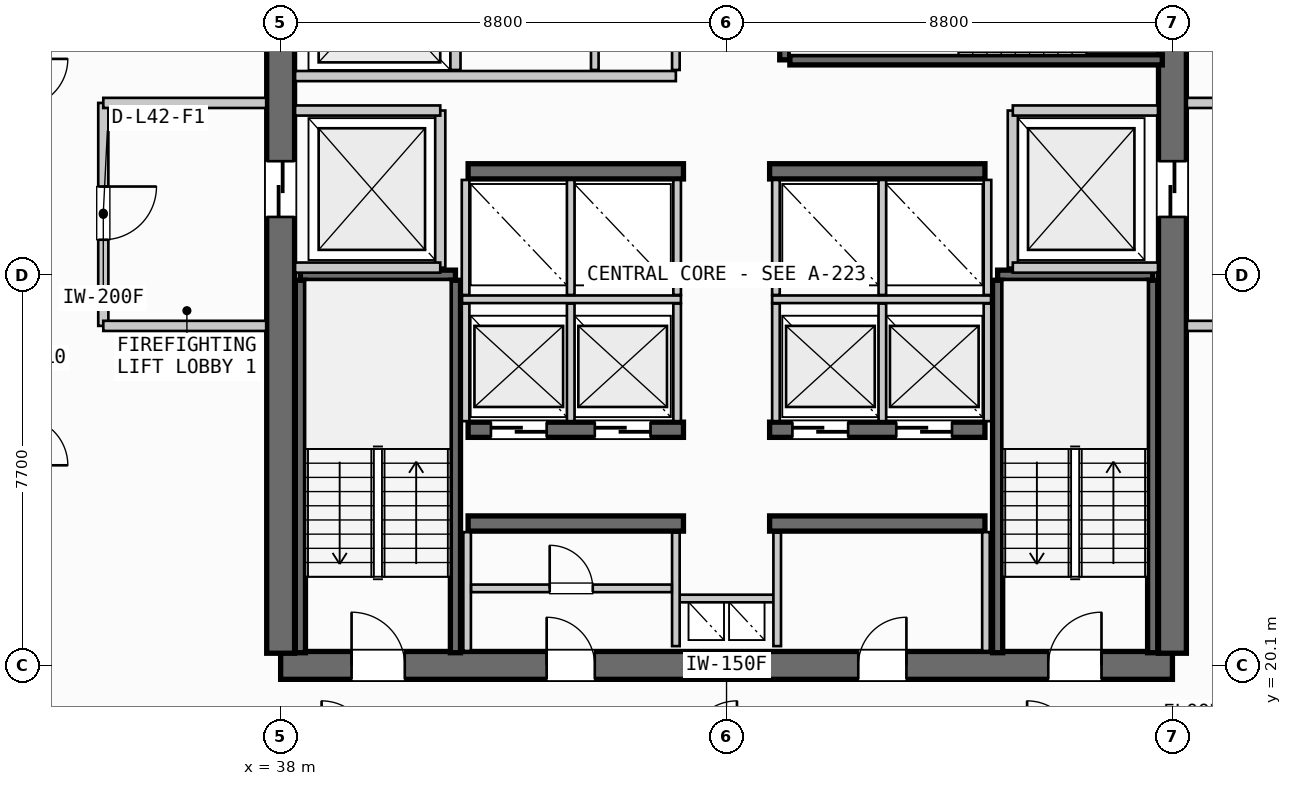
"""IFC4 building model, lengths in metres.
Left out: names, types, materials, properties, quantities, classifications, styles, units other than length and angle.
Written with IfcOpenShell. Run it as: python <this file> out.ifc"""

import sys

from ifc_helpers import new_model, si_unit, direction, frame, frame_2d, origin, place, context, subcontext, project, spatial, rectangle, extrude, source, transform, mapped, element, fill, save


model = new_model("IFC4")
c1 = context("Model", 3, precision=1e-05, world=origin(), true_north=direction((0.0, 1.0)))
c2 = subcontext(c1, "Body", "Model", "MODEL_VIEW")
j1 = project(units=[si_unit("LENGTHUNIT", "METRE"), si_unit("PLANEANGLEUNIT", "RADIAN")], contexts=[c1])
p1 = place(None, origin())
s1 = spatial("IfcSite", under=j1, at=p1, CompositionType="ELEMENT")
p2 = place(p1, origin())
s2 = spatial("IfcBuilding", under=s1, at=p2, CompositionType="ELEMENT")
p3 = place(p2, frame((0.0, 0.0, 164.3)))
s3 = spatial("IfcBuildingStorey", under=s2, at=p3, CompositionType="ELEMENT", Elevation=164.3)
p4 = place(p3, frame((38.0, 20.1, 0.0), z_axis=(0.0, 0.0, 1.0), x_axis=(1.0, 0.0, 0.0)))
e1 = element("IfcWall", 1, at=p4, inside=s3, PredefinedType="SHEAR", context=c2, shape_type="SweptSolid", body=[
    extrude(rectangle(XDim=17.6, YDim=0.55, at=frame_2d((8.8, 0.0))), origin(), (0.0, 0.0, 1.0), 3.3),
])
p5 = place(p4, frame((1.4, 0.0, 0.0)))
e2 = element("IfcOpeningElement", 2, at=p5, cuts=e1, PredefinedType="OPENING", context=c2, shape_type="SweptSolid", body=[
    extrude(rectangle(XDim=1.05, YDim=2.15, at=frame_2d((0.525, 1.075))), frame((0.0, 0.285, 0.0), z_axis=(0.0, -1.0, 0.0), x_axis=(1.0, 0.0, 0.0)), (0.0, 0.0, 1.0), 0.57),
])
p6 = place(p4, frame((15.15, 0.0, 0.0)))
e3 = element("IfcOpeningElement", 3, at=p6, cuts=e1, PredefinedType="OPENING", context=c2, shape_type="SweptSolid", body=[
    extrude(rectangle(XDim=1.05, YDim=2.15, at=frame_2d((0.525, 1.075))), frame((0.0, 0.285, 0.0), z_axis=(0.0, -1.0, 0.0), x_axis=(1.0, 0.0, 0.0)), (0.0, 0.0, 1.0), 0.57),
])
p7 = place(p4, frame((5.25, 0.0, 0.0)))
e4 = element("IfcOpeningElement", 4, at=p7, cuts=e1, PredefinedType="OPENING", context=c2, shape_type="SweptSolid", body=[
    extrude(rectangle(XDim=0.95, YDim=2.15, at=frame_2d((0.475, 1.075))), frame((0.0, 0.285, 0.0), z_axis=(0.0, -1.0, 0.0), x_axis=(1.0, 0.0, 0.0)), (0.0, 0.0, 1.0), 0.57),
])
p8 = place(p4, frame((11.4, 0.0, 0.0)))
e5 = element("IfcOpeningElement", 5, at=p8, cuts=e1, PredefinedType="OPENING", context=c2, shape_type="SweptSolid", body=[
    extrude(rectangle(XDim=0.95, YDim=2.15, at=frame_2d((0.475, 1.075))), frame((0.0, 0.285, 0.0), z_axis=(0.0, -1.0, 0.0), x_axis=(1.0, 0.0, 0.0)), (0.0, 0.0, 1.0), 0.57),
])
p9 = place(p3, frame((38.0, 35.26, 0.0), z_axis=(0.0, 0.0, 1.0), x_axis=(0.0, -1.0, 0.0)))
e6 = element("IfcWall", 6, at=p9, inside=s3, PredefinedType="SHEAR", context=c2, shape_type="SweptSolid", body=[
    extrude(rectangle(XDim=14.92, YDim=0.55, at=frame_2d((7.46, 0.0))), origin(), (0.0, 0.0, 1.0), 3.3),
])
p10 = place(p9, frame((5.21, 0.0, 0.0)))
e7 = element("IfcOpeningElement", 7, at=p10, cuts=e6, PredefinedType="OPENING", context=c2, shape_type="SweptSolid", body=[
    extrude(rectangle(XDim=1.1, YDim=2.2, at=frame_2d((0.55, 1.1))), frame((0.0, 0.285, 0.0), z_axis=(0.0, -1.0, 0.0), x_axis=(1.0, 0.0, 0.0)), (0.0, 0.0, 1.0), 0.57),
])
p11 = place(p3, frame((55.6, 20.34, 0.0), z_axis=(0.0, 0.0, 1.0), x_axis=(0.0, 1.0, 0.0)))
e8 = element("IfcWall", 8, at=p11, inside=s3, PredefinedType="SHEAR", context=c2, shape_type="SweptSolid", body=[
    extrude(rectangle(XDim=14.92, YDim=0.55, at=frame_2d((7.46, 0.0))), origin(), (0.0, 0.0, 1.0), 3.3),
])
p12 = place(p11, frame((12.71, 0.0, 0.0)))
e9 = element("IfcOpeningElement", 9, at=p12, cuts=e8, PredefinedType="OPENING", context=c2, shape_type="SweptSolid", body=[
    extrude(rectangle(XDim=1.05, YDim=2.15, at=frame_2d((0.525, 1.075))), frame((0.0, 0.285, 0.0), z_axis=(0.0, -1.0, 0.0), x_axis=(1.0, 0.0, 0.0)), (0.0, 0.0, 1.0), 0.57),
])
p13 = place(p11, frame((8.61, 0.0, 0.0)))
e10 = element("IfcOpeningElement", 10, at=p13, cuts=e8, PredefinedType="OPENING", context=c2, shape_type="SweptSolid", body=[
    extrude(rectangle(XDim=1.1, YDim=2.2, at=frame_2d((0.55, 1.1))), frame((0.0, 0.285, 0.0), z_axis=(0.0, -1.0, 0.0), x_axis=(1.0, 0.0, 0.0)), (0.0, 0.0, 1.0), 0.57),
])
for number, where, z_axis, x_axis in (
    (11, (41.7, 22.9, 0.0), (0.0, 0.0, 1.0), (1.0, 0.0, 0.0)),
    (12, (47.65, 22.9, 0.0), (0.0, 0.0, 1.0), (1.0, 0.0, 0.0)),
):
    element("IfcWall", number, at=place(p3, frame(where, z_axis=z_axis, x_axis=x_axis)), inside=s3, PredefinedType="SHEAR", context=c2, shape_type="SweptSolid", body=[
        extrude(rectangle(XDim=4.25, YDim=0.3, at=frame_2d((2.125, 0.0))), origin(), (0.0, 0.0, 1.0), 3.3),
    ])
p14 = place(p3, frame((41.7, 24.75, 0.0), z_axis=(0.0, 0.0, 1.0), x_axis=(1.0, 0.0, 0.0)))
e13 = element("IfcWall", 13, at=p14, inside=s3, PredefinedType="SHEAR", context=c2, shape_type="SweptSolid", body=[
    extrude(rectangle(XDim=4.25, YDim=0.3, at=frame_2d((2.125, 0.0))), origin(), (0.0, 0.0, 1.0), 3.3),
])
p15 = place(p14, frame((0.45, 0.0, 0.0)))
e14 = element("IfcOpeningElement", 14, at=p15, cuts=e13, PredefinedType="OPENING", context=c2, shape_type="SweptSolid", body=[
    extrude(rectangle(XDim=1.1, YDim=2.2, at=frame_2d((0.55, 1.1))), frame((0.0, 0.16, 0.0), z_axis=(0.0, -1.0, 0.0), x_axis=(1.0, 0.0, 0.0)), (0.0, 0.0, 1.0), 0.32),
])
p16 = place(p14, frame((2.5, 0.0, 0.0)))
e15 = element("IfcOpeningElement", 15, at=p16, cuts=e13, PredefinedType="OPENING", context=c2, shape_type="SweptSolid", body=[
    extrude(rectangle(XDim=1.1, YDim=2.2, at=frame_2d((0.55, 1.1))), frame((0.0, 0.16, 0.0), z_axis=(0.0, -1.0, 0.0), x_axis=(1.0, 0.0, 0.0)), (0.0, 0.0, 1.0), 0.32),
])
p17 = place(p3, frame((47.65, 24.75, 0.0), z_axis=(0.0, 0.0, 1.0), x_axis=(1.0, 0.0, 0.0)))
e16 = element("IfcWall", 16, at=p17, inside=s3, PredefinedType="SHEAR", context=c2, shape_type="SweptSolid", body=[
    extrude(rectangle(XDim=4.25, YDim=0.3, at=frame_2d((2.125, 0.0))), origin(), (0.0, 0.0, 1.0), 3.3),
])
p18 = place(p17, frame((0.45, 0.0, 0.0)))
e17 = element("IfcOpeningElement", 17, at=p18, cuts=e16, PredefinedType="OPENING", context=c2, shape_type="SweptSolid", body=[
    extrude(rectangle(XDim=1.1, YDim=2.2, at=frame_2d((0.55, 1.1))), frame((0.0, 0.16, 0.0), z_axis=(0.0, -1.0, 0.0), x_axis=(1.0, 0.0, 0.0)), (0.0, 0.0, 1.0), 0.32),
])
p19 = place(p17, frame((2.5, 0.0, 0.0)))
e18 = element("IfcOpeningElement", 18, at=p19, cuts=e16, PredefinedType="OPENING", context=c2, shape_type="SweptSolid", body=[
    extrude(rectangle(XDim=1.1, YDim=2.2, at=frame_2d((0.55, 1.1))), frame((0.0, 0.16, 0.0), z_axis=(0.0, -1.0, 0.0), x_axis=(1.0, 0.0, 0.0)), (0.0, 0.0, 1.0), 0.32),
])
for number, where, z_axis, x_axis in (
    (19, (41.7, 29.85, 0.0), (0.0, 0.0, 1.0), (1.0, 0.0, 0.0)),
    (20, (47.65, 29.85, 0.0), (0.0, 0.0, 1.0), (1.0, 0.0, 0.0)),
):
    element("IfcWall", number, at=place(p3, frame(where, z_axis=z_axis, x_axis=x_axis)), inside=s3, PredefinedType="SHEAR", context=c2, shape_type="SweptSolid", body=[
        extrude(rectangle(XDim=4.25, YDim=0.3, at=frame_2d((2.125, 0.0))), origin(), (0.0, 0.0, 1.0), 3.3),
    ])
p20 = place(p3, frame((38.39, 27.8, 0.0), z_axis=(0.0, 0.0, 1.0), x_axis=(1.0, 0.0, 0.0)))
e21 = element("IfcWall", 21, at=p20, inside=s3, PredefinedType="SHEAR", context=c2, shape_type="SweptSolid", body=[
    extrude(rectangle(XDim=3.06, YDim=0.2, at=frame_2d((1.53, 0.0))), origin(), (0.0, 0.0, 1.0), 3.3),
])
for number, where, z_axis, x_axis in (
    (22, (41.45, 27.7, 0.0), (0.0, 0.0, 1.0), (0.0, -1.0, 0.0)),
    (23, (38.39, 20.35, 0.0), (0.0, 0.0, 1.0), (0.0, 1.0, 0.0)),
):
    element("IfcWall", number, at=place(p3, frame(where, z_axis=z_axis, x_axis=x_axis)), inside=s3, PredefinedType="SHEAR", context=c2, shape_type="SweptSolid", body=[
        extrude(rectangle(XDim=7.35, YDim=0.2, at=frame_2d((3.675, 0.0))), origin(), (0.0, 0.0, 1.0), 3.3),
    ])
p21 = place(p3, frame((52.15, 27.8, 0.0), z_axis=(0.0, 0.0, 1.0), x_axis=(1.0, 0.0, 0.0)))
e24 = element("IfcWall", 24, at=p21, inside=s3, PredefinedType="SHEAR", context=c2, shape_type="SweptSolid", body=[
    extrude(rectangle(XDim=3.06, YDim=0.2, at=frame_2d((1.53, 0.0))), origin(), (0.0, 0.0, 1.0), 3.3),
])
for number, where, z_axis, x_axis in (
    (25, (55.21, 27.7, 0.0), (0.0, 0.0, 1.0), (0.0, -1.0, 0.0)),
    (26, (52.15, 20.35, 0.0), (0.0, 0.0, 1.0), (0.0, 1.0, 0.0)),
):
    element("IfcWall", number, at=place(p3, frame(where, z_axis=z_axis, x_axis=x_axis)), inside=s3, PredefinedType="SHEAR", context=c2, shape_type="SweptSolid", body=[
        extrude(rectangle(XDim=7.35, YDim=0.2, at=frame_2d((3.675, 0.0))), origin(), (0.0, 0.0, 1.0), 3.3),
    ])
p22 = place(p3, frame((47.95, 32.05, 0.0), z_axis=(0.0, 0.0, 1.0), x_axis=(0.0, 1.0, 0.0)))
e27 = element("IfcWall", 27, at=p22, inside=s3, PredefinedType="SHEAR", context=c2, shape_type="SweptSolid", body=[
    extrude(rectangle(XDim=3.06, YDim=0.2, at=frame_2d((1.53, 0.0))), origin(), (0.0, 0.0, 1.0), 3.3),
])
p23 = place(p3, frame((55.4, 32.05, 0.0), z_axis=(0.0, 0.0, 1.0), x_axis=(-1.0, 0.0, 0.0)))
e28 = element("IfcWall", 28, at=p23, inside=s3, PredefinedType="SHEAR", context=c2, shape_type="SweptSolid", body=[
    extrude(rectangle(XDim=7.35, YDim=0.2, at=frame_2d((3.675, 0.0))), origin(), (0.0, 0.0, 1.0), 3.3),
])
p24 = place(p3, frame((45.8, 21.42, 0.0), z_axis=(0.0, 0.0, 1.0), x_axis=(1.0, 0.0, 0.0)))
e29 = element("IfcWall", 29, at=p24, inside=s3, PredefinedType="PARTITIONING", context=c2, shape_type="SweptSolid", body=[
    extrude(rectangle(XDim=2.0, YDim=0.15, at=frame_2d((1.0, 0.0))), origin(), (0.0, 0.0, 1.0), 2.28),
])
for number, where, z_axis, x_axis in (
    (30, (45.8, 20.48, 0.0), (0.0, 0.0, 1.0), (0.0, 1.0, 0.0)),
    (31, (47.8, 20.48, 0.0), (0.0, 0.0, 1.0), (0.0, 1.0, 0.0)),
):
    element("IfcWall", number, at=place(p3, frame(where, z_axis=z_axis, x_axis=x_axis)), inside=s3, PredefinedType="PARTITIONING", context=c2, shape_type="SweptSolid", body=[
        extrude(rectangle(XDim=2.24, YDim=0.15, at=frame_2d((1.12, 0.0))), origin(), (0.0, 0.0, 1.0), 2.28),
    ])
p25 = place(p3, frame((41.15, 27.95, 0.0), z_axis=(0.0, 0.0, 1.0), x_axis=(0.0, 1.0, 0.0)))
e32 = element("IfcWall", 32, at=p25, inside=s3, PredefinedType="PARTITIONING", context=c2, shape_type="SweptSolid", body=[
    extrude(rectangle(XDim=3.1, YDim=0.2, at=frame_2d((1.55, 0.0))), origin(), (0.0, 0.0, 1.0), 2.28),
])
for number, where, z_axis, x_axis in (
    (33, (38.285, 27.95, 0.0), (0.0, 0.0, 1.0), (1.0, 0.0, 0.0)),
    (34, (38.285, 31.05, 0.0), (0.0, 0.0, 1.0), (1.0, 0.0, 0.0)),
):
    element("IfcWall", number, at=place(p3, frame(where, z_axis=z_axis, x_axis=x_axis)), inside=s3, PredefinedType="PARTITIONING", context=c2, shape_type="SweptSolid", body=[
        extrude(rectangle(XDim=2.865, YDim=0.2, at=frame_2d((1.433, 0.0))), origin(), (0.0, 0.0, 1.0), 2.28),
    ])
p26 = place(p3, frame((34.5, 31.2, 0.0), z_axis=(0.0, 0.0, 1.0), x_axis=(0.0, -1.0, 0.0)))
e35 = element("IfcWall", 35, at=p26, inside=s3, PredefinedType="PARTITIONING", context=c2, shape_type="SweptSolid", body=[
    extrude(rectangle(XDim=4.4, YDim=0.2, at=frame_2d((2.2, 0.0))), origin(), (0.0, 0.0, 1.0), 2.28),
])
p27 = place(p26, frame((1.65, 0.0, 0.0)))
e36 = element("IfcOpeningElement", 36, at=p27, cuts=e35, PredefinedType="OPENING", context=c2, shape_type="SweptSolid", body=[
    extrude(rectangle(XDim=1.05, YDim=2.15, at=frame_2d((0.525, 1.075))), frame((0.0, 0.11, 0.0), z_axis=(0.0, -1.0, 0.0), x_axis=(1.0, 0.0, 0.0)), (0.0, 0.0, 1.0), 0.22),
])
for number, where, z_axis, x_axis in (
    (37, (34.5, 26.8, 0.0), (0.0, 0.0, 1.0), (1.0, 0.0, 0.0)),
    (38, (34.5, 31.2, 0.0), (0.0, 0.0, 1.0), (1.0, 0.0, 0.0)),
):
    element("IfcWall", number, at=place(p3, frame(where, z_axis=z_axis, x_axis=x_axis)), inside=s3, PredefinedType="PARTITIONING", context=c2, shape_type="SweptSolid", body=[
        extrude(rectangle(XDim=3.215, YDim=0.2, at=frame_2d((1.607, 0.0))), origin(), (0.0, 0.0, 1.0), 2.28),
    ])
p28 = place(p3, frame((52.45, 27.95, 0.0), z_axis=(0.0, 0.0, 1.0), x_axis=(0.0, 1.0, 0.0)))
e39 = element("IfcWall", 39, at=p28, inside=s3, PredefinedType="PARTITIONING", context=c2, shape_type="SweptSolid", body=[
    extrude(rectangle(XDim=3.1, YDim=0.2, at=frame_2d((1.55, 0.0))), origin(), (0.0, 0.0, 1.0), 2.28),
])
for number, where, z_axis, x_axis in (
    (40, (52.45, 27.95, 0.0), (0.0, 0.0, 1.0), (1.0, 0.0, 0.0)),
    (41, (52.45, 31.05, 0.0), (0.0, 0.0, 1.0), (1.0, 0.0, 0.0)),
):
    element("IfcWall", number, at=place(p3, frame(where, z_axis=z_axis, x_axis=x_axis)), inside=s3, PredefinedType="PARTITIONING", context=c2, shape_type="SweptSolid", body=[
        extrude(rectangle(XDim=2.865, YDim=0.2, at=frame_2d((1.433, 0.0))), origin(), (0.0, 0.0, 1.0), 2.28),
    ])
for number, where, z_axis, x_axis in (
    (42, (55.885, 26.8, 0.0), (0.0, 0.0, 1.0), (1.0, 0.0, 0.0)),
    (43, (55.885, 31.2, 0.0), (0.0, 0.0, 1.0), (1.0, 0.0, 0.0)),
):
    element("IfcWall", number, at=place(p3, frame(where, z_axis=z_axis, x_axis=x_axis)), inside=s3, PredefinedType="PARTITIONING", context=c2, shape_type="SweptSolid", body=[
        extrude(rectangle(XDim=3.215, YDim=0.2, at=frame_2d((1.607, 0.0))), origin(), (0.0, 0.0, 1.0), 2.28),
    ])
for number, where, z_axis, x_axis in (
    (44, (41.68, 20.385, 0.0), (0.0, 0.0, 1.0), (0.0, 1.0, 0.0)),
    (45, (51.92, 20.385, 0.0), (0.0, 0.0, 1.0), (0.0, 1.0, 0.0)),
):
    element("IfcWall", number, at=place(p3, frame(where, z_axis=z_axis, x_axis=x_axis)), inside=s3, PredefinedType="PARTITIONING", context=c2, shape_type="SweptSolid", body=[
        extrude(rectangle(XDim=2.345, YDim=0.15, at=frame_2d((1.172, 0.0))), origin(), (0.0, 0.0, 1.0), 2.28),
    ])
p29 = place(p3, frame((41.76, 21.62, 0.0), z_axis=(0.0, 0.0, 1.0), x_axis=(1.0, 0.0, 0.0)))
e46 = element("IfcWall", 46, at=p29, inside=s3, PredefinedType="PARTITIONING", context=c2, shape_type="SweptSolid", body=[
    extrude(rectangle(XDim=3.96, YDim=0.15, at=frame_2d((1.98, 0.0))), origin(), (0.0, 0.0, 1.0), 2.28),
])
p30 = place(p29, frame((1.55, 0.0, 0.0)))
e47 = element("IfcOpeningElement", 47, at=p30, cuts=e46, PredefinedType="OPENING", context=c2, shape_type="SweptSolid", body=[
    extrude(rectangle(XDim=0.85, YDim=2.15, at=frame_2d((0.425, 1.075))), frame((0.0, 0.085, 0.0), z_axis=(0.0, -1.0, 0.0), x_axis=(1.0, 0.0, 0.0)), (0.0, 0.0, 1.0), 0.17),
])
p31 = place(p3, frame((41.58, 27.325, 0.0), z_axis=(0.0, 0.0, 1.0), x_axis=(1.0, 0.0, 0.0)))
e48 = element("IfcWall", 48, at=p31, inside=s3, PredefinedType="PARTITIONING", context=c2, shape_type="SweptSolid", body=[
    extrude(rectangle(XDim=4.32, YDim=0.15, at=frame_2d((2.16, 0.0))), origin(), (0.0, 0.0, 1.0), 2.28),
])
p32 = place(p3, frame((47.7, 27.325, 0.0), z_axis=(0.0, 0.0, 1.0), x_axis=(1.0, 0.0, 0.0)))
e49 = element("IfcWall", 49, at=p32, inside=s3, PredefinedType="PARTITIONING", context=c2, shape_type="SweptSolid", body=[
    extrude(rectangle(XDim=4.32, YDim=0.15, at=frame_2d((2.16, 0.0))), origin(), (0.0, 0.0, 1.0), 2.28),
])
for number, where, z_axis, x_axis in (
    (50, (41.65, 24.92, 0.0), (0.0, 0.0, 1.0), (0.0, 1.0, 0.0)),
    (51, (43.725, 24.92, 0.0), (0.0, 0.0, 1.0), (0.0, 1.0, 0.0)),
    (52, (45.825, 24.92, 0.0), (0.0, 0.0, 1.0), (0.0, 1.0, 0.0)),
    (53, (47.775, 24.92, 0.0), (0.0, 0.0, 1.0), (0.0, 1.0, 0.0)),
    (54, (49.875, 24.92, 0.0), (0.0, 0.0, 1.0), (0.0, 1.0, 0.0)),
    (55, (51.95, 24.92, 0.0), (0.0, 0.0, 1.0), (0.0, 1.0, 0.0)),
):
    element("IfcWall", number, at=place(p3, frame(where, z_axis=z_axis, x_axis=x_axis)), inside=s3, PredefinedType="PARTITIONING", context=c2, shape_type="SweptSolid", body=[
        extrude(rectangle(XDim=2.32, YDim=0.15, at=frame_2d((1.16, 0.0))), origin(), (0.0, 0.0, 1.0), 2.28),
    ])
for number, where, z_axis, x_axis in (
    (56, (41.65, 27.41, 0.0), (0.0, 0.0, 1.0), (0.0, 1.0, 0.0)),
    (57, (43.725, 27.41, 0.0), (0.0, 0.0, 1.0), (0.0, 1.0, 0.0)),
    (58, (45.825, 27.41, 0.0), (0.0, 0.0, 1.0), (0.0, 1.0, 0.0)),
    (59, (47.775, 27.41, 0.0), (0.0, 0.0, 1.0), (0.0, 1.0, 0.0)),
    (60, (49.875, 27.41, 0.0), (0.0, 0.0, 1.0), (0.0, 1.0, 0.0)),
    (61, (51.95, 27.41, 0.0), (0.0, 0.0, 1.0), (0.0, 1.0, 0.0)),
):
    element("IfcWall", number, at=place(p3, frame(where, z_axis=z_axis, x_axis=x_axis)), inside=s3, PredefinedType="PARTITIONING", context=c2, shape_type="SweptSolid", body=[
        extrude(rectangle(XDim=2.27, YDim=0.15, at=frame_2d((1.135, 0.0))), origin(), (0.0, 0.0, 1.0), 2.28),
    ])
p33 = place(p3, frame((41.45, 31.85, 0.0), z_axis=(0.0, 0.0, 1.0), x_axis=(0.0, 1.0, 0.0)))
e62 = element("IfcWall", 62, at=p33, inside=s3, PredefinedType="PARTITIONING", context=c2, shape_type="SweptSolid", body=[
    extrude(rectangle(XDim=3.365, YDim=0.2, at=frame_2d((1.683, 0.0))), origin(), (0.0, 0.0, 1.0), 2.28),
])
p34 = place(p3, frame((38.285, 31.73, 0.0), z_axis=(0.0, 0.0, 1.0), x_axis=(1.0, 0.0, 0.0)))
e63 = element("IfcWall", 63, at=p34, inside=s3, PredefinedType="PARTITIONING", context=c2, shape_type="SweptSolid", body=[
    extrude(rectangle(XDim=7.515, YDim=0.2, at=frame_2d((3.758, 0.0))), origin(), (0.0, 0.0, 1.0), 2.28),
])
p35 = place(p3, frame((45.8, 31.85, 0.0), z_axis=(0.0, 0.0, 1.0), x_axis=(0.0, 1.0, 0.0)))
e64 = element("IfcWall", 64, at=p35, inside=s3, PredefinedType="PARTITIONING", context=c2, shape_type="SweptSolid", body=[
    extrude(rectangle(XDim=3.365, YDim=0.15, at=frame_2d((1.683, 0.0))), origin(), (0.0, 0.0, 1.0), 2.28),
])
p36 = place(p3, frame((44.2, 31.85, 0.0), z_axis=(0.0, 0.0, 1.0), x_axis=(0.0, 1.0, 0.0)))
e65 = element("IfcWall", 65, at=p36, inside=s3, PredefinedType="PLUMBINGWALL", context=c2, shape_type="SweptSolid", body=[
    extrude(rectangle(XDim=3.365, YDim=0.15, at=frame_2d((1.683, 0.0))), origin(), (0.0, 0.0, 1.0), 2.28),
])
m1 = source(origin(), c2, "Body", "SweptSolid", [
    extrude(rectangle(XDim=1.05, YDim=2.15, at=frame_2d((0.525, 1.075))), frame((0.0, 0.025, 0.0), z_axis=(0.0, -1.0, 0.0), x_axis=(1.0, 0.0, 0.0)), (0.0, 0.0, 1.0), 0.05),
])
p37 = place(p5, origin())
e66 = element("IfcDoor", 66, at=p37, inside=s3, OperationType="SINGLE_SWING_LEFT", PredefinedType="DOOR", context=c2, shape_type="MappedRepresentation", body=[
    mapped(m1, transform((0.0, 0.0, 0.0), scale=1.0)),
])
fill(e2, e66)
p38 = place(p6, origin())
e67 = element("IfcDoor", 67, at=p38, inside=s3, OperationType="SINGLE_SWING_RIGHT", PredefinedType="DOOR", context=c2, shape_type="MappedRepresentation", body=[
    mapped(m1, transform((0.0, 0.0, 0.0), scale=1.0)),
])
fill(e3, e67)
m2 = source(origin(), c2, "Body", "SweptSolid", [
    extrude(rectangle(XDim=1.1, YDim=2.2, at=frame_2d((0.55, 1.1))), frame((0.0, 0.025, 0.0), z_axis=(0.0, -1.0, 0.0), x_axis=(1.0, 0.0, 0.0)), (0.0, 0.0, 1.0), 0.05),
])
p39 = place(p10, origin())
e68 = element("IfcDoor", 68, at=p39, inside=s3, OperationType="SLIDING_TO_LEFT", PredefinedType="DOOR", context=c2, shape_type="MappedRepresentation", body=[
    mapped(m2, transform((0.0, 0.0, 0.0), scale=1.0)),
])
fill(e7, e68)
p40 = place(p13, origin())
e69 = element("IfcDoor", 69, at=p40, inside=s3, OperationType="SLIDING_TO_RIGHT", PredefinedType="DOOR", context=c2, shape_type="MappedRepresentation", body=[
    mapped(m2, transform((0.0, 0.0, 0.0), scale=1.0)),
])
fill(e10, e69)
m3 = source(origin(), c2, "Body", "SweptSolid", [
    extrude(rectangle(XDim=0.95, YDim=2.15, at=frame_2d((0.475, 1.075))), frame((0.0, 0.025, 0.0), z_axis=(0.0, -1.0, 0.0), x_axis=(1.0, 0.0, 0.0)), (0.0, 0.0, 1.0), 0.05),
])
p41 = place(p7, origin())
e70 = element("IfcDoor", 70, at=p41, inside=s3, OperationType="SINGLE_SWING_LEFT", PredefinedType="DOOR", context=c2, shape_type="MappedRepresentation", body=[
    mapped(m3, transform((0.0, 0.0, 0.0), scale=1.0)),
])
fill(e4, e70)
p42 = place(p8, origin())
e71 = element("IfcDoor", 71, at=p42, inside=s3, OperationType="SINGLE_SWING_RIGHT", PredefinedType="DOOR", context=c2, shape_type="MappedRepresentation", body=[
    mapped(m3, transform((0.0, 0.0, 0.0), scale=1.0)),
])
fill(e5, e71)
p43 = place(p15, origin())
e72 = element("IfcDoor", 72, at=p43, inside=s3, OperationType="SLIDING_TO_RIGHT", PredefinedType="DOOR", context=c2, shape_type="MappedRepresentation", body=[
    mapped(m2, transform((0.0, 0.0, 0.0), scale=1.0)),
])
fill(e14, e72)
p44 = place(p16, origin())
e73 = element("IfcDoor", 73, at=p44, inside=s3, OperationType="SLIDING_TO_RIGHT", PredefinedType="DOOR", context=c2, shape_type="MappedRepresentation", body=[
    mapped(m2, transform((0.0, 0.0, 0.0), scale=1.0)),
])
fill(e15, e73)
p45 = place(p18, origin())
e74 = element("IfcDoor", 74, at=p45, inside=s3, OperationType="SLIDING_TO_RIGHT", PredefinedType="DOOR", context=c2, shape_type="MappedRepresentation", body=[
    mapped(m2, transform((0.0, 0.0, 0.0), scale=1.0)),
])
fill(e17, e74)
p46 = place(p19, origin())
e75 = element("IfcDoor", 75, at=p46, inside=s3, OperationType="SLIDING_TO_RIGHT", PredefinedType="DOOR", context=c2, shape_type="MappedRepresentation", body=[
    mapped(m2, transform((0.0, 0.0, 0.0), scale=1.0)),
])
fill(e18, e75)
p47 = place(p27, origin())
e76 = element("IfcDoor", 76, at=p47, inside=s3, OperationType="SINGLE_SWING_LEFT", PredefinedType="DOOR", context=c2, shape_type="MappedRepresentation", body=[
    mapped(m1, transform((0.0, 0.0, 0.0), scale=1.0)),
])
fill(e36, e76)
m4 = source(origin(), c2, "Body", "SweptSolid", [
    extrude(rectangle(XDim=0.85, YDim=2.15, at=frame_2d((0.425, 1.075))), frame((0.0, 0.025, 0.0), z_axis=(0.0, -1.0, 0.0), x_axis=(1.0, 0.0, 0.0)), (0.0, 0.0, 1.0), 0.05),
])
p48 = place(p30, origin())
e77 = element("IfcDoor", 77, at=p48, inside=s3, OperationType="SINGLE_SWING_LEFT", PredefinedType="DOOR", context=c2, shape_type="MappedRepresentation", body=[
    mapped(m4, transform((0.0, 0.0, 0.0), scale=1.0)),
])
fill(e47, e77)
save(model, sys.argv[1])
